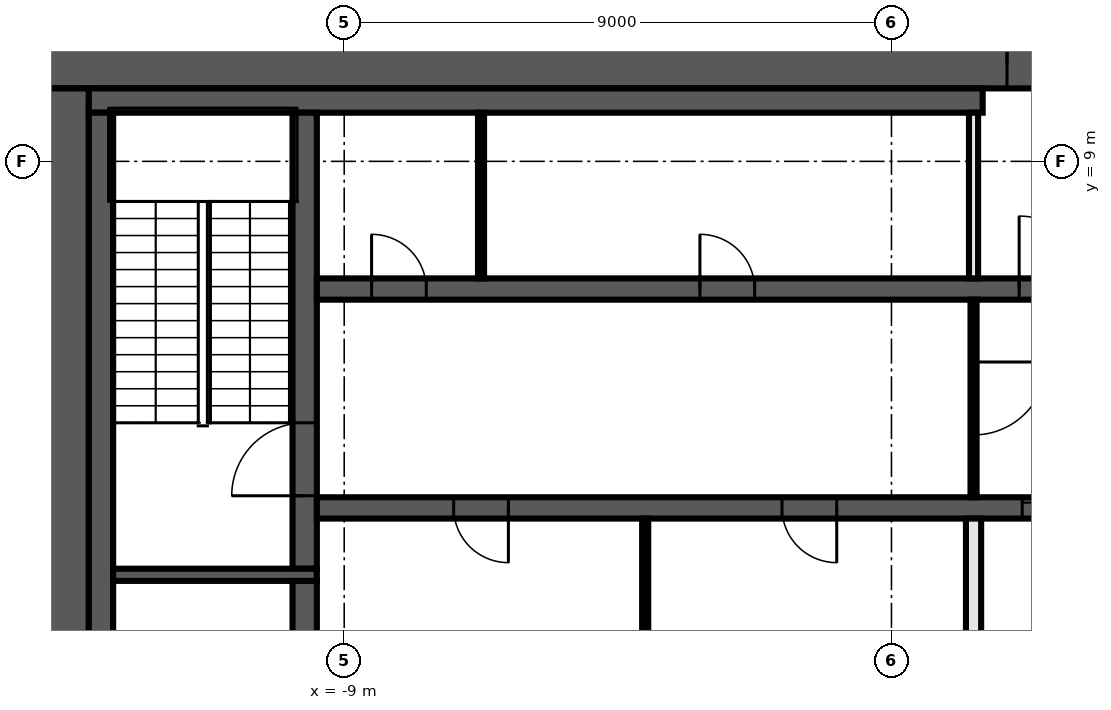
"""IFC4 building model, lengths in metres.
Left out: names, types, materials, properties, quantities, classifications, styles, units other than length and angle.
Written with IfcOpenShell. Run it as: python <this file> out.ifc"""

import sys

from ifc_helpers import new_model, si_unit, direction, frame, frame_2d, origin, place, context, subcontext, project, spatial, rectangle, extrude, element, fill, save


model = new_model("IFC4")
c1 = context("Model", 3, precision=1e-05, world=origin(), true_north=direction((0.0, 1.0)))
c2 = subcontext(c1, "Body", "Model", "MODEL_VIEW")
j1 = project(units=[si_unit("LENGTHUNIT", "METRE"), si_unit("PLANEANGLEUNIT", "RADIAN")], contexts=[c1])
p1 = place(None, origin())
s1 = spatial("IfcSite", under=j1, at=p1, CompositionType="ELEMENT")
p2 = place(p1, origin())
s2 = spatial("IfcBuilding", under=s1, at=p2, CompositionType="ELEMENT")
p3 = place(p2, frame((0.0, 0.0, 215.6)))
s3 = spatial("IfcBuildingStorey", under=s2, at=p3, CompositionType="ELEMENT", Elevation=215.6)
p4 = place(p3, frame((-14.0, 10.6, 0.0), z_axis=(0.0, 0.0, 1.0), x_axis=(1.0, 0.0, 0.0)))
e1 = element("IfcWall", 1, at=p4, inside=s3, PredefinedType="SHEAR", context=c2, shape_type="SweptSolid", body=[
    extrude(rectangle(XDim=28.0, YDim=0.8, at=frame_2d((14.0, 0.0))), origin(), (0.0, 0.0, 1.0), 4.4),
])
p5 = place(p4, frame((15.9, 0.0, 0.0)))
e2 = element("IfcOpeningElement", 2, at=p5, cuts=e1, PredefinedType="OPENING", context=c2, shape_type="SweptSolid", body=[
    extrude(rectangle(XDim=1.6, YDim=2.1, at=frame_2d((0.8, 1.05))), frame((0.0, 0.41, 0.0), z_axis=(0.0, -1.0, 0.0), x_axis=(1.0, 0.0, 0.0)), (0.0, 0.0, 1.0), 0.82),
])
p6 = place(p3, frame((-13.6, -10.2, 0.0), z_axis=(0.0, 0.0, 1.0), x_axis=(0.0, 1.0, 0.0)))
e3 = element("IfcWall", 3, at=p6, inside=s3, PredefinedType="SHEAR", context=c2, shape_type="SweptSolid", body=[
    extrude(rectangle(XDim=20.4, YDim=0.8, at=frame_2d((10.2, 0.0))), origin(), (0.0, 0.0, 1.0), 4.4),
])
p7 = place(p3, frame((-13.2, 10.0, 0.0), z_axis=(0.0, 0.0, 1.0), x_axis=(1.0, 0.0, 0.0)))
e4 = element("IfcWall", 4, at=p7, inside=s3, PredefinedType="SHEAR", context=c2, shape_type="SweptSolid", body=[
    extrude(rectangle(XDim=14.7, YDim=0.4, at=frame_2d((7.35, 0.0))), origin(), (0.0, 0.0, 1.0), 4.4),
])
p8 = place(p3, frame((-13.0, -9.8, 0.0), z_axis=(0.0, 0.0, 1.0), x_axis=(0.0, 1.0, 0.0)))
e5 = element("IfcWall", 5, at=p8, inside=s3, PredefinedType="SHEAR", context=c2, shape_type="SweptSolid", body=[
    extrude(rectangle(XDim=19.6, YDim=0.4, at=frame_2d((9.8, 0.0))), origin(), (0.0, 0.0, 1.0), 4.4),
])
p9 = place(p3, frame((-9.65, -2.1, 0.0), z_axis=(0.0, 0.0, 1.0), x_axis=(0.0, 1.0, 0.0)))
e6 = element("IfcWall", 6, at=p9, inside=s3, PredefinedType="SHEAR", context=c2, shape_type="SweptSolid", body=[
    extrude(rectangle(XDim=4.2, YDim=0.4, at=frame_2d((2.1, 0.0))), origin(), (0.0, 0.0, 1.0), 4.4),
])
p10 = place(p3, frame((-9.65, 2.3, 0.0), z_axis=(0.0, 0.0, 1.0), x_axis=(0.0, 1.0, 0.0)))
e7 = element("IfcWall", 7, at=p10, inside=s3, PredefinedType="SHEAR", context=c2, shape_type="SweptSolid", body=[
    extrude(rectangle(XDim=7.5, YDim=0.4, at=frame_2d((3.75, 0.0))), origin(), (0.0, 0.0, 1.0), 4.4),
])
p11 = place(p10, frame((1.2, 0.0, 0.0)))
e8 = element("IfcOpeningElement", 8, at=p11, cuts=e7, PredefinedType="OPENING", context=c2, shape_type="SweptSolid", body=[
    extrude(rectangle(XDim=1.2, YDim=2.1, at=frame_2d((0.6, 1.05))), frame((0.0, 0.21, 0.0), z_axis=(0.0, -1.0, 0.0), x_axis=(1.0, 0.0, 0.0)), (0.0, 0.0, 1.0), 0.42),
])
p12 = place(p3, frame((-9.45, 2.2, 0.0), z_axis=(0.0, 0.0, 1.0), x_axis=(-1.0, 0.0, 0.0)))
e9 = element("IfcWall", 9, at=p12, inside=s3, PredefinedType="SHEAR", context=c2, shape_type="SweptSolid", body=[
    extrude(rectangle(XDim=3.35, YDim=0.2, at=frame_2d((1.675, 0.0))), origin(), (0.0, 0.0, 1.0), 4.4),
])
p13 = place(p3, frame((-9.45, 6.9, 0.0), z_axis=(0.0, 0.0, 1.0), x_axis=(1.0, 0.0, 0.0)))
e10 = element("IfcWall", 10, at=p13, inside=s3, PredefinedType="SHEAR", context=c2, shape_type="SweptSolid", body=[
    extrude(rectangle(XDim=18.9, YDim=0.35, at=frame_2d((9.45, 0.0))), origin(), (0.0, 0.0, 1.0), 4.4),
])
p14 = place(p13, frame((11.55, 0.0, 0.0)))
e11 = element("IfcOpeningElement", 11, at=p14, cuts=e10, PredefinedType="OPENING", context=c2, shape_type="SweptSolid", body=[
    extrude(rectangle(XDim=1.2, YDim=2.1, at=frame_2d((0.6, 1.05))), frame((0.0, 0.185, 0.0), z_axis=(0.0, -1.0, 0.0), x_axis=(1.0, 0.0, 0.0)), (0.0, 0.0, 1.0), 0.37),
])
p15 = place(p13, frame((14.3, 0.0, 0.0)))
e12 = element("IfcOpeningElement", 12, at=p15, cuts=e10, PredefinedType="OPENING", context=c2, shape_type="SweptSolid", body=[
    extrude(rectangle(XDim=1.1, YDim=2.1, at=frame_2d((0.55, 1.05))), frame((0.0, 0.185, 0.0), z_axis=(0.0, -1.0, 0.0), x_axis=(1.0, 0.0, 0.0)), (0.0, 0.0, 1.0), 0.37),
])
p16 = place(p13, frame((17.0, 0.0, 0.0)))
e13 = element("IfcOpeningElement", 13, at=p16, cuts=e10, PredefinedType="OPENING", context=c2, shape_type="SweptSolid", body=[
    extrude(rectangle(XDim=1.1, YDim=2.1, at=frame_2d((0.55, 1.05))), frame((0.0, 0.185, 0.0), z_axis=(0.0, -1.0, 0.0), x_axis=(1.0, 0.0, 0.0)), (0.0, 0.0, 1.0), 0.37),
])
p17 = place(p13, frame((0.9, 0.0, 0.0)))
e14 = element("IfcOpeningElement", 14, at=p17, cuts=e10, PredefinedType="OPENING", context=c2, shape_type="SweptSolid", body=[
    extrude(rectangle(XDim=0.9, YDim=2.1, at=frame_2d((0.45, 1.05))), frame((0.0, 0.185, 0.0), z_axis=(0.0, -1.0, 0.0), x_axis=(1.0, 0.0, 0.0)), (0.0, 0.0, 1.0), 0.37),
])
p18 = place(p13, frame((6.3, 0.0, 0.0)))
e15 = element("IfcOpeningElement", 15, at=p18, cuts=e10, PredefinedType="OPENING", context=c2, shape_type="SweptSolid", body=[
    extrude(rectangle(XDim=0.9, YDim=2.1, at=frame_2d((0.45, 1.05))), frame((0.0, 0.185, 0.0), z_axis=(0.0, -1.0, 0.0), x_axis=(1.0, 0.0, 0.0)), (0.0, 0.0, 1.0), 0.37),
])
p19 = place(p3, frame((9.45, 3.3, 0.0), z_axis=(0.0, 0.0, 1.0), x_axis=(-1.0, 0.0, 0.0)))
e16 = element("IfcWall", 16, at=p19, inside=s3, PredefinedType="SHEAR", context=c2, shape_type="SweptSolid", body=[
    extrude(rectangle(XDim=18.9, YDim=0.35, at=frame_2d((9.45, 0.0))), origin(), (0.0, 0.0, 1.0), 4.4),
])
p20 = place(p19, frame((6.2, 0.0, 0.0)))
e17 = element("IfcOpeningElement", 17, at=p20, cuts=e16, PredefinedType="OPENING", context=c2, shape_type="SweptSolid", body=[
    extrude(rectangle(XDim=1.1, YDim=2.1, at=frame_2d((0.55, 1.05))), frame((0.0, 0.185, 0.0), z_axis=(0.0, -1.0, 0.0), x_axis=(1.0, 0.0, 0.0)), (0.0, 0.0, 1.0), 0.37),
])
p21 = place(p19, frame((3.5, 0.0, 0.0)))
e18 = element("IfcOpeningElement", 18, at=p21, cuts=e16, PredefinedType="OPENING", context=c2, shape_type="SweptSolid", body=[
    extrude(rectangle(XDim=1.1, YDim=2.1, at=frame_2d((0.55, 1.05))), frame((0.0, 0.185, 0.0), z_axis=(0.0, -1.0, 0.0), x_axis=(1.0, 0.0, 0.0)), (0.0, 0.0, 1.0), 0.37),
])
p22 = place(p19, frame((0.9, 0.0, 0.0)))
e19 = element("IfcOpeningElement", 19, at=p22, cuts=e16, PredefinedType="OPENING", context=c2, shape_type="SweptSolid", body=[
    extrude(rectangle(XDim=0.9, YDim=2.1, at=frame_2d((0.45, 1.05))), frame((0.0, 0.185, 0.0), z_axis=(0.0, -1.0, 0.0), x_axis=(1.0, 0.0, 0.0)), (0.0, 0.0, 1.0), 0.37),
])
p23 = place(p19, frame((15.75, 0.0, 0.0)))
e20 = element("IfcOpeningElement", 20, at=p23, cuts=e16, PredefinedType="OPENING", context=c2, shape_type="SweptSolid", body=[
    extrude(rectangle(XDim=0.9, YDim=2.1, at=frame_2d((0.45, 1.05))), frame((0.0, 0.185, 0.0), z_axis=(0.0, -1.0, 0.0), x_axis=(1.0, 0.0, 0.0)), (0.0, 0.0, 1.0), 0.37),
])
p24 = place(p19, frame((10.35, 0.0, 0.0)))
e21 = element("IfcOpeningElement", 21, at=p24, cuts=e16, PredefinedType="OPENING", context=c2, shape_type="SweptSolid", body=[
    extrude(rectangle(XDim=0.9, YDim=2.1, at=frame_2d((0.45, 1.05))), frame((0.0, 0.185, 0.0), z_axis=(0.0, -1.0, 0.0), x_axis=(1.0, 0.0, 0.0)), (0.0, 0.0, 1.0), 0.37),
])
p25 = place(p3, frame((1.35, 7.075, 0.0), z_axis=(0.0, 0.0, 1.0), x_axis=(0.0, 1.0, 0.0)))
e22 = element("IfcWall", 22, at=p25, inside=s3, PredefinedType="PARTITIONING", context=c2, shape_type="SweptSolid", body=[
    extrude(rectangle(XDim=2.725, YDim=0.15, at=frame_2d((1.363, 0.0))), origin(), (0.0, 0.0, 1.0), 4.4),
])
p26 = place(p3, frame((1.35, 6.725, 0.0), z_axis=(0.0, 0.0, 1.0), x_axis=(0.0, -1.0, 0.0)))
e23 = element("IfcWall", 23, at=p26, inside=s3, PredefinedType="PARTITIONING", context=c2, shape_type="SweptSolid", body=[
    extrude(rectangle(XDim=3.25, YDim=0.1, at=frame_2d((1.625, 0.0))), origin(), (0.0, 0.0, 1.0), 4.4),
])
p27 = place(p26, frame((1.025, 0.0, 0.0)))
e24 = element("IfcOpeningElement", 24, at=p27, cuts=e23, PredefinedType="OPENING", context=c2, shape_type="SweptSolid", body=[
    extrude(rectangle(XDim=1.2, YDim=2.1, at=frame_2d((0.6, 1.05))), frame((0.0, 0.06, 0.0), z_axis=(0.0, -1.0, 0.0), x_axis=(1.0, 0.0, 0.0)), (0.0, 0.0, 1.0), 0.12),
])
p28 = place(p3, frame((1.35, 0.4, 0.0), z_axis=(0.0, 0.0, 1.0), x_axis=(0.0, 1.0, 0.0)))
e25 = element("IfcWall", 25, at=p28, inside=s3, PredefinedType="SOLIDWALL", context=c2, shape_type="SweptSolid", body=[
    extrude(rectangle(XDim=2.725, YDim=0.25, at=frame_2d((1.363, 0.0))), origin(), (0.0, 0.0, 1.0), 4.4),
])
for number, where, z_axis, x_axis in (
    (26, (-4.05, 0.4, 0.0), (0.0, 0.0, 1.0), (0.0, 1.0, 0.0)),
    (27, (-6.75, 7.075, 0.0), (0.0, 0.0, 1.0), (0.0, 1.0, 0.0)),
):
    element("IfcWall", number, at=place(p3, frame(where, z_axis=z_axis, x_axis=x_axis)), inside=s3, PredefinedType="PARTITIONING", context=c2, shape_type="SweptSolid", body=[
        extrude(rectangle(XDim=2.725, YDim=0.1, at=frame_2d((1.363, 0.0))), origin(), (0.0, 0.0, 1.0), 4.4),
    ])
p29 = place(p5, origin())
e28 = element("IfcDoor", 28, at=p29, inside=s3, OperationType="DOUBLE_DOOR_SINGLE_SWING", PredefinedType="DOOR", context=c2, shape_type="SweptSolid", body=[
    extrude(rectangle(XDim=1.6, YDim=2.1, at=frame_2d((0.8, 1.05))), frame((0.0, 0.025, 0.0), z_axis=(0.0, -1.0, 0.0), x_axis=(1.0, 0.0, 0.0)), (0.0, 0.0, 1.0), 0.05),
])
fill(e2, e28)
p30 = place(p14, origin())
e29 = element("IfcDoor", 29, at=p30, inside=s3, OperationType="SINGLE_SWING_LEFT", PredefinedType="DOOR", context=c2, shape_type="SweptSolid", body=[
    extrude(rectangle(XDim=1.2, YDim=2.1, at=frame_2d((0.6, 1.05))), frame((0.0, 0.025, 0.0), z_axis=(0.0, -1.0, 0.0), x_axis=(1.0, 0.0, 0.0)), (0.0, 0.0, 1.0), 0.05),
])
fill(e11, e29)
p31 = place(p20, origin())
e30 = element("IfcDoor", 30, at=p31, inside=s3, OperationType="DOUBLE_DOOR_SLIDING", PredefinedType="DOOR", context=c2, shape_type="SweptSolid", body=[
    extrude(rectangle(XDim=1.1, YDim=2.1, at=frame_2d((0.55, 1.05))), frame((0.0, 0.025, 0.0), z_axis=(0.0, -1.0, 0.0), x_axis=(1.0, 0.0, 0.0)), (0.0, 0.0, 1.0), 0.05),
])
fill(e17, e30)
p32 = place(p17, origin())
e31 = element("IfcDoor", 31, at=p32, inside=s3, OperationType="SINGLE_SWING_RIGHT", PredefinedType="DOOR", context=c2, shape_type="SweptSolid", body=[
    extrude(rectangle(XDim=0.9, YDim=2.1, at=frame_2d((0.45, 1.05))), frame((0.0, 0.025, 0.0), z_axis=(0.0, -1.0, 0.0), x_axis=(1.0, 0.0, 0.0)), (0.0, 0.0, 1.0), 0.05),
])
fill(e14, e31)
p33 = place(p18, origin())
e32 = element("IfcDoor", 32, at=p33, inside=s3, OperationType="SINGLE_SWING_LEFT", PredefinedType="DOOR", context=c2, shape_type="SweptSolid", body=[
    extrude(rectangle(XDim=0.9, YDim=2.1, at=frame_2d((0.45, 1.05))), frame((0.0, 0.025, 0.0), z_axis=(0.0, -1.0, 0.0), x_axis=(1.0, 0.0, 0.0)), (0.0, 0.0, 1.0), 0.05),
])
fill(e15, e32)
p34 = place(p23, origin())
e33 = element("IfcDoor", 33, at=p34, inside=s3, OperationType="SINGLE_SWING_RIGHT", PredefinedType="DOOR", context=c2, shape_type="SweptSolid", body=[
    extrude(rectangle(XDim=0.9, YDim=2.1, at=frame_2d((0.45, 1.05))), frame((0.0, 0.025, 0.0), z_axis=(0.0, -1.0, 0.0), x_axis=(1.0, 0.0, 0.0)), (0.0, 0.0, 1.0), 0.05),
])
fill(e20, e33)
p35 = place(p24, origin())
e34 = element("IfcDoor", 34, at=p35, inside=s3, OperationType="SINGLE_SWING_LEFT", PredefinedType="DOOR", context=c2, shape_type="SweptSolid", body=[
    extrude(rectangle(XDim=0.9, YDim=2.1, at=frame_2d((0.45, 1.05))), frame((0.0, 0.025, 0.0), z_axis=(0.0, -1.0, 0.0), x_axis=(1.0, 0.0, 0.0)), (0.0, 0.0, 1.0), 0.05),
])
fill(e21, e34)
p36 = place(p11, origin())
e35 = element("IfcDoor", 35, at=p36, inside=s3, OperationType="SINGLE_SWING_RIGHT", PredefinedType="DOOR", context=c2, shape_type="SweptSolid", body=[
    extrude(rectangle(XDim=1.2, YDim=2.1, at=frame_2d((0.6, 1.05))), frame((0.0, 0.025, 0.0), z_axis=(0.0, -1.0, 0.0), x_axis=(1.0, 0.0, 0.0)), (0.0, 0.0, 1.0), 0.05),
])
fill(e8, e35)
p37 = place(p27, origin())
e36 = element("IfcDoor", 36, at=p37, inside=s3, OperationType="SINGLE_SWING_LEFT", PredefinedType="DOOR", context=c2, shape_type="SweptSolid", body=[
    extrude(rectangle(XDim=1.2, YDim=2.1, at=frame_2d((0.6, 1.05))), frame((0.0, 0.025, 0.0), z_axis=(0.0, -1.0, 0.0), x_axis=(1.0, 0.0, 0.0)), (0.0, 0.0, 1.0), 0.05),
])
fill(e24, e36)
save(model, sys.argv[1])
